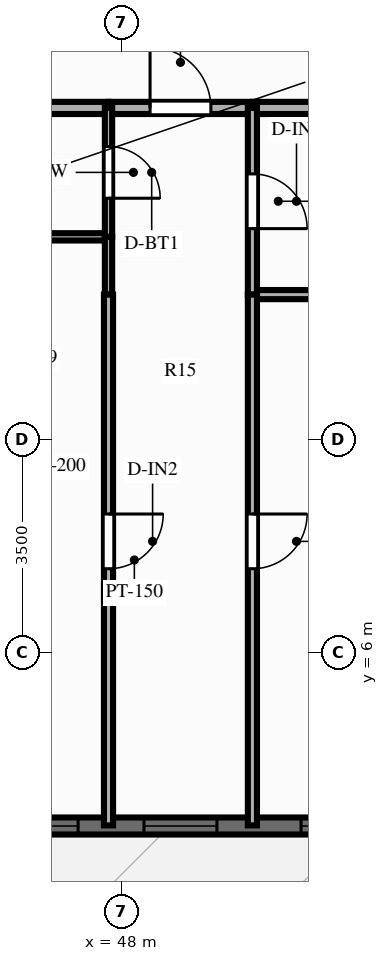
"""IFC4 building model, lengths in metres.
Left out: names, types, materials, properties, quantities, classifications, styles, units other than length and angle.
Written with IfcOpenShell. Run it as: python <this file> out.ifc"""

import sys

from ifc_helpers import new_model, si_unit, direction, frame, frame_2d, origin, place, context, subcontext, project, spatial, rectangle, extrude, source, transform, mapped, element, fill, save


model = new_model("IFC4")
c1 = context("Model", 3, precision=1e-05, world=origin(), true_north=direction((0.0, 1.0)))
c2 = subcontext(c1, "Body", "Model", "MODEL_VIEW")
j1 = project(units=[si_unit("LENGTHUNIT", "METRE"), si_unit("PLANEANGLEUNIT", "RADIAN")], contexts=[c1])
p1 = place(None, origin())
s1 = spatial("IfcSite", under=j1, at=p1, CompositionType="ELEMENT")
p2 = place(p1, origin())
s2 = spatial("IfcBuilding", under=s1, at=p2, CompositionType="ELEMENT")
p3 = place(p2, frame((0.0, 0.0, 25.4)))
s3 = spatial("IfcBuildingStorey", under=s2, at=p3, CompositionType="ELEMENT", Elevation=25.4)
p4 = place(p3, frame((15.5, 3.14, 0.0), z_axis=(0.0, 0.0, 1.0), x_axis=(1.0, 0.0, 0.0)))
e1 = element("IfcWall", 1, at=p4, inside=s3, PredefinedType="SOLIDWALL", context=c2, shape_type="SweptSolid", body=[
    extrude(rectangle(XDim=45.0, YDim=0.28, at=frame_2d((22.5, 0.0))), origin(), (0.0, 0.0, 1.0), 2.28),
])
p5 = place(p4, frame((0.785, 0.0, 0.25)))
e2 = element("IfcOpeningElement", 2, at=p5, cuts=e1, PredefinedType="OPENING", context=c2, shape_type="SweptSolid", body=[
    extrude(rectangle(XDim=1.2, YDim=1.5, at=frame_2d((0.6, 0.75))), frame((0.0, 0.152, 0.0), z_axis=(0.0, -1.0, 0.0), x_axis=(1.0, 0.0, 0.0)), (0.0, 0.0, 1.0), 0.304),
])
p6 = place(p4, frame((3.033, 0.0, 0.25)))
e3 = element("IfcOpeningElement", 3, at=p6, cuts=e1, PredefinedType="OPENING", context=c2, shape_type="SweptSolid", body=[
    extrude(rectangle(XDim=1.2, YDim=1.5, at=frame_2d((0.6, 0.75))), frame((0.0, 0.152, 0.0), z_axis=(0.0, -1.0, 0.0), x_axis=(1.0, 0.0, 0.0)), (0.0, 0.0, 1.0), 0.304),
])
p7 = place(p4, frame((5.727, 0.0, 0.25)))
e4 = element("IfcOpeningElement", 4, at=p7, cuts=e1, PredefinedType="OPENING", context=c2, shape_type="SweptSolid", body=[
    extrude(rectangle(XDim=1.2, YDim=1.5, at=frame_2d((0.6, 0.75))), frame((0.0, 0.152, 0.0), z_axis=(0.0, -1.0, 0.0), x_axis=(1.0, 0.0, 0.0)), (0.0, 0.0, 1.0), 0.304),
])
p8 = place(p4, frame((8.269, 0.0, 0.25)))
e5 = element("IfcOpeningElement", 5, at=p8, cuts=e1, PredefinedType="OPENING", context=c2, shape_type="SweptSolid", body=[
    extrude(rectangle(XDim=1.2, YDim=1.5, at=frame_2d((0.6, 0.75))), frame((0.0, 0.152, 0.0), z_axis=(0.0, -1.0, 0.0), x_axis=(1.0, 0.0, 0.0)), (0.0, 0.0, 1.0), 0.304),
])
p9 = place(p4, frame((10.621, 0.0, 0.25)))
e6 = element("IfcOpeningElement", 6, at=p9, cuts=e1, PredefinedType="OPENING", context=c2, shape_type="SweptSolid", body=[
    extrude(rectangle(XDim=1.2, YDim=1.5, at=frame_2d((0.6, 0.75))), frame((0.0, 0.152, 0.0), z_axis=(0.0, -1.0, 0.0), x_axis=(1.0, 0.0, 0.0)), (0.0, 0.0, 1.0), 0.304),
])
p10 = place(p4, frame((13.316, 0.0, 0.25)))
e7 = element("IfcOpeningElement", 7, at=p10, cuts=e1, PredefinedType="OPENING", context=c2, shape_type="SweptSolid", body=[
    extrude(rectangle(XDim=1.2, YDim=1.5, at=frame_2d((0.6, 0.75))), frame((0.0, 0.152, 0.0), z_axis=(0.0, -1.0, 0.0), x_axis=(1.0, 0.0, 0.0)), (0.0, 0.0, 1.0), 0.304),
])
p11 = place(p4, frame((16.624, 0.0, 0.25)))
e8 = element("IfcOpeningElement", 8, at=p11, cuts=e1, PredefinedType="OPENING", context=c2, shape_type="SweptSolid", body=[
    extrude(rectangle(XDim=0.7, YDim=1.5, at=frame_2d((0.35, 0.75))), frame((0.0, 0.152, 0.0), z_axis=(0.0, -1.0, 0.0), x_axis=(1.0, 0.0, 0.0)), (0.0, 0.0, 1.0), 0.304),
])
p12 = place(p4, frame((18.141, 0.0, 0.25)))
e9 = element("IfcOpeningElement", 9, at=p12, cuts=e1, PredefinedType="OPENING", context=c2, shape_type="SweptSolid", body=[
    extrude(rectangle(XDim=1.2, YDim=1.5, at=frame_2d((0.6, 0.75))), frame((0.0, 0.152, 0.0), z_axis=(0.0, -1.0, 0.0), x_axis=(1.0, 0.0, 0.0)), (0.0, 0.0, 1.0), 0.304),
])
p13 = place(p4, frame((21.874, 0.0, 0.0), z_axis=(0.0, 0.0, 1.0), x_axis=(-1.0, 0.0, 0.0)))
e10 = element("IfcOpeningElement", 10, at=p13, cuts=e1, PredefinedType="OPENING", context=c2, shape_type="SweptSolid", body=[
    extrude(rectangle(XDim=1.1, YDim=2.15, at=frame_2d((0.55, 1.075))), frame((0.0, 0.152, 0.0), z_axis=(0.0, -1.0, 0.0), x_axis=(1.0, 0.0, 0.0)), (0.0, 0.0, 1.0), 0.304),
])
p14 = place(p4, frame((23.223, 0.0, 0.25)))
e11 = element("IfcOpeningElement", 11, at=p14, cuts=e1, PredefinedType="OPENING", context=c2, shape_type="SweptSolid", body=[
    extrude(rectangle(XDim=1.2, YDim=1.5, at=frame_2d((0.6, 0.75))), frame((0.0, 0.152, 0.0), z_axis=(0.0, -1.0, 0.0), x_axis=(1.0, 0.0, 0.0)), (0.0, 0.0, 1.0), 0.304),
])
p15 = place(p4, frame((25.507, 0.0, 0.25)))
e12 = element("IfcOpeningElement", 12, at=p15, cuts=e1, PredefinedType="OPENING", context=c2, shape_type="SweptSolid", body=[
    extrude(rectangle(XDim=1.2, YDim=1.5, at=frame_2d((0.6, 0.75))), frame((0.0, 0.152, 0.0), z_axis=(0.0, -1.0, 0.0), x_axis=(1.0, 0.0, 0.0)), (0.0, 0.0, 1.0), 0.304),
])
p16 = place(p4, frame((27.6, 0.0, 0.25)))
e13 = element("IfcOpeningElement", 13, at=p16, cuts=e1, PredefinedType="OPENING", context=c2, shape_type="SweptSolid", body=[
    extrude(rectangle(XDim=0.7, YDim=1.5, at=frame_2d((0.35, 0.75))), frame((0.0, 0.152, 0.0), z_axis=(0.0, -1.0, 0.0), x_axis=(1.0, 0.0, 0.0)), (0.0, 0.0, 1.0), 0.304),
])
p17 = place(p4, frame((30.589, 0.0, 0.25)))
e14 = element("IfcOpeningElement", 14, at=p17, cuts=e1, PredefinedType="OPENING", context=c2, shape_type="SweptSolid", body=[
    extrude(rectangle(XDim=1.2, YDim=1.5, at=frame_2d((0.6, 0.75))), frame((0.0, 0.152, 0.0), z_axis=(0.0, -1.0, 0.0), x_axis=(1.0, 0.0, 0.0)), (0.0, 0.0, 1.0), 0.304),
])
p18 = place(p4, frame((32.872, 0.0, 0.25)))
e15 = element("IfcOpeningElement", 15, at=p18, cuts=e1, PredefinedType="OPENING", context=c2, shape_type="SweptSolid", body=[
    extrude(rectangle(XDim=1.2, YDim=1.5, at=frame_2d((0.6, 0.75))), frame((0.0, 0.152, 0.0), z_axis=(0.0, -1.0, 0.0), x_axis=(1.0, 0.0, 0.0)), (0.0, 0.0, 1.0), 0.304),
])
p19 = place(p4, frame((35.455, 0.0, 0.25)))
e16 = element("IfcOpeningElement", 16, at=p19, cuts=e1, PredefinedType="OPENING", context=c2, shape_type="SweptSolid", body=[
    extrude(rectangle(XDim=1.2, YDim=1.5, at=frame_2d((0.6, 0.75))), frame((0.0, 0.152, 0.0), z_axis=(0.0, -1.0, 0.0), x_axis=(1.0, 0.0, 0.0)), (0.0, 0.0, 1.0), 0.304),
])
p20 = place(p4, frame((37.954, 0.0, 0.25)))
e17 = element("IfcOpeningElement", 17, at=p20, cuts=e1, PredefinedType="OPENING", context=c2, shape_type="SweptSolid", body=[
    extrude(rectangle(XDim=1.2, YDim=1.5, at=frame_2d((0.6, 0.75))), frame((0.0, 0.152, 0.0), z_axis=(0.0, -1.0, 0.0), x_axis=(1.0, 0.0, 0.0)), (0.0, 0.0, 1.0), 0.304),
])
p21 = place(p4, frame((40.238, 0.0, 0.25)))
e18 = element("IfcOpeningElement", 18, at=p21, cuts=e1, PredefinedType="OPENING", context=c2, shape_type="SweptSolid", body=[
    extrude(rectangle(XDim=1.2, YDim=1.5, at=frame_2d((0.6, 0.75))), frame((0.0, 0.152, 0.0), z_axis=(0.0, -1.0, 0.0), x_axis=(1.0, 0.0, 0.0)), (0.0, 0.0, 1.0), 0.304),
])
p22 = place(p4, frame((42.716, 0.0, 0.25)))
e19 = element("IfcOpeningElement", 19, at=p22, cuts=e1, PredefinedType="OPENING", context=c2, shape_type="SweptSolid", body=[
    extrude(rectangle(XDim=1.2, YDim=1.5, at=frame_2d((0.6, 0.75))), frame((0.0, 0.152, 0.0), z_axis=(0.0, -1.0, 0.0), x_axis=(1.0, 0.0, 0.0)), (0.0, 0.0, 1.0), 0.304),
])
p23 = place(p3, frame((45.589, 14.95, 0.0), z_axis=(0.0, 0.0, 1.0), x_axis=(1.0, 0.0, 0.0)))
e20 = element("IfcWall", 20, at=p23, inside=s3, PredefinedType="PARTITIONING", context=c2, shape_type="SweptSolid", body=[
    extrude(rectangle(XDim=2.2, YDim=0.2, at=frame_2d((1.1, 0.0))), origin(), (0.0, 0.0, 1.0), 2.79),
])
p24 = place(p3, frame((47.789, 14.95, 0.0), z_axis=(0.0, 0.0, 1.0), x_axis=(1.0, 0.0, 0.0)))
e21 = element("IfcWall", 21, at=p24, inside=s3, PredefinedType="PARTITIONING", context=c2, shape_type="SweptSolid", body=[
    extrude(rectangle(XDim=2.367, YDim=0.2, at=frame_2d((1.183, 0.0))), origin(), (0.0, 0.0, 1.0), 2.79),
])
p25 = place(p24, frame((0.683, 0.0, 0.0)))
e22 = element("IfcOpeningElement", 22, at=p25, cuts=e21, PredefinedType="OPENING", context=c2, shape_type="SweptSolid", body=[
    extrude(rectangle(XDim=1.0, YDim=2.15, at=frame_2d((0.5, 1.075))), frame((0.0, 0.112, 0.0), z_axis=(0.0, -1.0, 0.0), x_axis=(1.0, 0.0, 0.0)), (0.0, 0.0, 1.0), 0.224),
])
p26 = place(p3, frame((50.156, 14.95, 0.0), z_axis=(0.0, 0.0, 1.0), x_axis=(1.0, 0.0, 0.0)))
e23 = element("IfcWall", 23, at=p26, inside=s3, PredefinedType="PARTITIONING", context=c2, shape_type="SweptSolid", body=[
    extrude(rectangle(XDim=2.799, YDim=0.2, at=frame_2d((1.399, 0.0))), origin(), (0.0, 0.0, 1.0), 2.79),
])
p27 = place(p3, frame((45.589, 12.83, 0.0), z_axis=(0.0, 0.0, 1.0), x_axis=(1.0, 0.0, 0.0)))
e24 = element("IfcWall", 24, at=p27, inside=s3, PredefinedType="PARTITIONING", context=c2, shape_type="SweptSolid", body=[
    extrude(rectangle(XDim=2.2, YDim=0.12, at=frame_2d((1.1, 0.0))), origin(), (0.0, 0.0, 1.0), 2.79),
])
p28 = place(p3, frame((50.156, 11.88, 0.0), z_axis=(0.0, 0.0, 1.0), x_axis=(1.0, 0.0, 0.0)))
e25 = element("IfcWall", 25, at=p28, inside=s3, PredefinedType="PARTITIONING", context=c2, shape_type="SweptSolid", body=[
    extrude(rectangle(XDim=2.799, YDim=0.15, at=frame_2d((1.399, 0.0))), origin(), (0.0, 0.0, 1.0), 2.79),
])
p29 = place(p3, frame((47.789, 14.95, 0.0), z_axis=(0.0, 0.0, 1.0), x_axis=(0.0, -1.0, 0.0)))
e26 = element("IfcWall", 26, at=p29, inside=s3, PredefinedType="PARTITIONING", context=c2, shape_type="SweptSolid", body=[
    extrude(rectangle(XDim=2.12, YDim=0.12, at=frame_2d((1.06, 0.0))), origin(), (0.0, 0.0, 1.0), 2.79),
])
p30 = place(p29, frame((0.635, 0.0, 0.0)))
e27 = element("IfcOpeningElement", 27, at=p30, cuts=e26, PredefinedType="OPENING", context=c2, shape_type="SweptSolid", body=[
    extrude(rectangle(XDim=0.85, YDim=2.05, at=frame_2d((0.425, 1.025))), frame((0.0, 0.072, 0.0), z_axis=(0.0, -1.0, 0.0), x_axis=(1.0, 0.0, 0.0)), (0.0, 0.0, 1.0), 0.144),
])
p31 = place(p3, frame((47.789, 12.83, 0.0), z_axis=(0.0, 0.0, 1.0), x_axis=(0.0, -1.0, 0.0)))
e28 = element("IfcWall", 28, at=p31, inside=s3, PredefinedType="PARTITIONING", context=c2, shape_type="SweptSolid", body=[
    extrude(rectangle(XDim=0.95, YDim=0.12, at=frame_2d((0.475, 0.0))), origin(), (0.0, 0.0, 1.0), 2.79),
])
p32 = place(p3, frame((47.789, 11.88, 0.0), z_axis=(0.0, 0.0, 1.0), x_axis=(0.0, -1.0, 0.0)))
e29 = element("IfcWall", 29, at=p32, inside=s3, PredefinedType="PARTITIONING", context=c2, shape_type="SweptSolid", body=[
    extrude(rectangle(XDim=8.73, YDim=0.15, at=frame_2d((4.365, 0.0))), origin(), (0.0, 0.0, 1.0), 2.79),
])
p33 = place(p32, frame((3.609, 0.0, 0.0)))
e30 = element("IfcOpeningElement", 30, at=p33, cuts=e29, PredefinedType="OPENING", context=c2, shape_type="SweptSolid", body=[
    extrude(rectangle(XDim=0.9, YDim=2.1, at=frame_2d((0.45, 1.05))), frame((0.0, 0.087, 0.0), z_axis=(0.0, -1.0, 0.0), x_axis=(1.0, 0.0, 0.0)), (0.0, 0.0, 1.0), 0.174),
])
p34 = place(p3, frame((50.156, 14.95, 0.0), z_axis=(0.0, 0.0, 1.0), x_axis=(0.0, -1.0, 0.0)))
e31 = element("IfcWall", 31, at=p34, inside=s3, PredefinedType="PARTITIONING", context=c2, shape_type="SweptSolid", body=[
    extrude(rectangle(XDim=3.07, YDim=0.15, at=frame_2d((1.535, 0.0))), origin(), (0.0, 0.0, 1.0), 2.79),
])
p35 = place(p34, frame((1.085, 0.0, 0.0)))
e32 = element("IfcOpeningElement", 32, at=p35, cuts=e31, PredefinedType="OPENING", context=c2, shape_type="SweptSolid", body=[
    extrude(rectangle(XDim=0.9, YDim=2.1, at=frame_2d((0.45, 1.05))), frame((0.0, 0.087, 0.0), z_axis=(0.0, -1.0, 0.0), x_axis=(1.0, 0.0, 0.0)), (0.0, 0.0, 1.0), 0.174),
])
p36 = place(p3, frame((50.156, 11.88, 0.0), z_axis=(0.0, 0.0, 1.0), x_axis=(0.0, -1.0, 0.0)))
e33 = element("IfcWall", 33, at=p36, inside=s3, PredefinedType="PARTITIONING", context=c2, shape_type="SweptSolid", body=[
    extrude(rectangle(XDim=8.73, YDim=0.15, at=frame_2d((4.365, 0.0))), origin(), (0.0, 0.0, 1.0), 2.79),
])
p37 = place(p36, frame((3.609, 0.0, 0.0)))
e34 = element("IfcOpeningElement", 34, at=p37, cuts=e33, PredefinedType="OPENING", context=c2, shape_type="SweptSolid", body=[
    extrude(rectangle(XDim=0.9, YDim=2.1, at=frame_2d((0.45, 1.05))), frame((0.0, 0.087, 0.0), z_axis=(0.0, -1.0, 0.0), x_axis=(1.0, 0.0, 0.0)), (0.0, 0.0, 1.0), 0.174),
])
m1 = source(origin(), c2, "Body", "SweptSolid", [
    extrude(rectangle(XDim=1.2, YDim=1.5, at=frame_2d((0.6, 0.75))), frame((0.0, 0.03, 0.0), z_axis=(0.0, -1.0, 0.0), x_axis=(1.0, 0.0, 0.0)), (0.0, 0.0, 1.0), 0.06),
])
p38 = place(p17, origin())
e35 = element("IfcWindow", 35, at=p38, inside=s3, PartitioningType="SINGLE_PANEL", PredefinedType="WINDOW", context=c2, shape_type="MappedRepresentation", body=[
    mapped(m1, transform((0.0, 0.0, 0.0), scale=1.0)),
])
fill(e14, e35)
p39 = place(p18, origin())
e36 = element("IfcWindow", 36, at=p39, inside=s3, PartitioningType="SINGLE_PANEL", PredefinedType="WINDOW", context=c2, shape_type="MappedRepresentation", body=[
    mapped(m1, transform((0.0, 0.0, 0.0), scale=1.0)),
])
fill(e15, e36)
p40 = place(p19, origin())
e37 = element("IfcWindow", 37, at=p40, inside=s3, PartitioningType="SINGLE_PANEL", PredefinedType="WINDOW", context=c2, shape_type="MappedRepresentation", body=[
    mapped(m1, transform((0.0, 0.0, 0.0), scale=1.0)),
])
fill(e16, e37)
m2 = source(origin(), c2, "Body", "SweptSolid", [
    extrude(rectangle(XDim=1.0, YDim=2.15, at=frame_2d((0.5, 1.075))), frame((0.0, 0.025, 0.0), z_axis=(0.0, -1.0, 0.0), x_axis=(1.0, 0.0, 0.0)), (0.0, 0.0, 1.0), 0.05),
])
p41 = place(p25, origin())
e38 = element("IfcDoor", 38, at=p41, inside=s3, OperationType="SINGLE_SWING_LEFT", PredefinedType="DOOR", context=c2, shape_type="MappedRepresentation", body=[
    mapped(m2, transform((0.0, 0.0, 0.0), scale=1.0)),
])
fill(e22, e38)
m3 = source(origin(), c2, "Body", "SweptSolid", [
    extrude(rectangle(XDim=0.85, YDim=2.05, at=frame_2d((0.425, 1.025))), frame((0.0, 0.025, 0.0), z_axis=(0.0, -1.0, 0.0), x_axis=(1.0, 0.0, 0.0)), (0.0, 0.0, 1.0), 0.05),
])
p42 = place(p30, origin())
e39 = element("IfcDoor", 39, at=p42, inside=s3, OperationType="SINGLE_SWING_RIGHT", PredefinedType="DOOR", context=c2, shape_type="MappedRepresentation", body=[
    mapped(m3, transform((0.0, 0.0, 0.0), scale=1.0)),
])
fill(e27, e39)
m4 = source(origin(), c2, "Body", "SweptSolid", [
    extrude(rectangle(XDim=0.9, YDim=2.1, at=frame_2d((0.45, 1.05))), frame((0.0, 0.025, 0.0), z_axis=(0.0, -1.0, 0.0), x_axis=(1.0, 0.0, 0.0)), (0.0, 0.0, 1.0), 0.05),
])
p43 = place(p33, origin())
e40 = element("IfcDoor", 40, at=p43, inside=s3, OperationType="SINGLE_SWING_LEFT", PredefinedType="DOOR", context=c2, shape_type="MappedRepresentation", body=[
    mapped(m4, transform((0.0, 0.0, 0.0), scale=1.0)),
])
fill(e30, e40)
p44 = place(p35, origin())
e41 = element("IfcDoor", 41, at=p44, inside=s3, OperationType="SINGLE_SWING_RIGHT", PredefinedType="DOOR", context=c2, shape_type="MappedRepresentation", body=[
    mapped(m4, transform((0.0, 0.0, 0.0), scale=1.0)),
])
fill(e32, e41)
p45 = place(p37, origin())
e42 = element("IfcDoor", 42, at=p45, inside=s3, OperationType="SINGLE_SWING_LEFT", PredefinedType="DOOR", context=c2, shape_type="MappedRepresentation", body=[
    mapped(m4, transform((0.0, 0.0, 0.0), scale=1.0)),
])
fill(e34, e42)
save(model, sys.argv[1])
